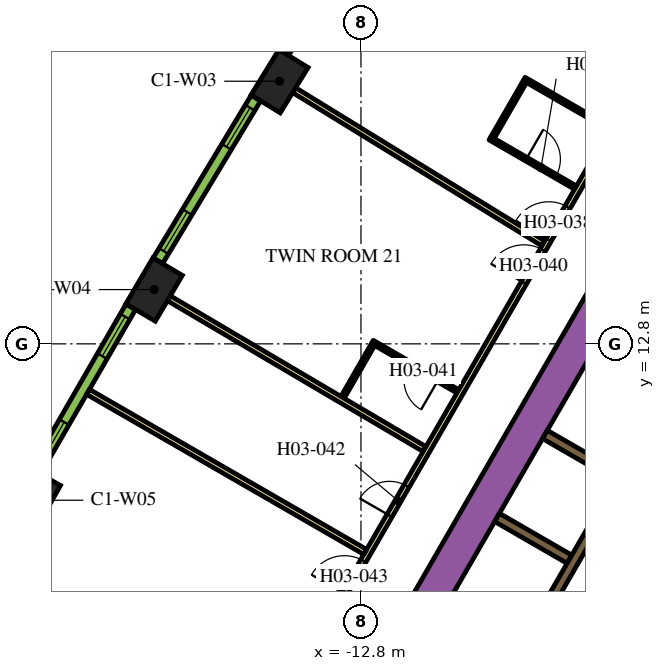
"""IFC4 building model, lengths in metres.
Left out: names, types, materials, properties, quantities, classifications, styles, units other than length and angle.
Written with IfcOpenShell. Run it as: python <this file> out.ifc"""

import sys

from ifc_helpers import new_model, si_unit, direction, frame, frame_2d, origin, origin_2d, place, context, subcontext, project, spatial, rectangle, extrude, element, fill, save


model = new_model("IFC4")
c1 = context("Model", 3, precision=1e-05, world=origin(), true_north=direction((0.0, 1.0)))
c2 = subcontext(c1, "Body", "Model", "MODEL_VIEW")
j1 = project(units=[si_unit("LENGTHUNIT", "METRE"), si_unit("PLANEANGLEUNIT", "RADIAN")], contexts=[c1])
p1 = place(None, origin())
s1 = spatial("IfcSite", under=j1, at=p1, CompositionType="ELEMENT")
p2 = place(p1, origin())
s2 = spatial("IfcBuilding", under=s1, at=p2, CompositionType="ELEMENT")
p3 = place(p2, frame((0.0, 0.0, 54.9)))
s3 = spatial("IfcBuildingStorey", under=s2, at=p3, CompositionType="ELEMENT", Elevation=54.9)
for number, where, z_axis, x_axis in (
    (1, (-14.942, 19.71, 0.0), (0.0, 0.0, 1.0), (-0.524, -0.852, 0.0)),
    (2, (-18.243, 14.228, 0.0), (0.0, 0.0, 1.0), (-0.508, -0.861, 0.0)),
    (3, (-21.443, 8.685, 0.0), (0.0, 0.0, 1.0), (-0.492, -0.871, 0.0)),
):
    element("IfcColumn", number, at=place(p3, frame(where, z_axis=z_axis, x_axis=x_axis)), inside=s3, PredefinedType="COLUMN", context=c2, shape_type="SweptSolid", body=[
        extrude(rectangle(XDim=1.4, YDim=0.9, at=origin_2d()), origin(), (0.0, 0.0, 1.0), 3.9),
    ])
p4 = place(p3, frame((-14.268, 0.387, 0.0), z_axis=(0.0, 0.0, 1.0), x_axis=(0.499994617707, 0.866028511231, 0.0)))
e4 = element("IfcWall", 4, at=p4, inside=s3, PredefinedType="SOLIDWALL", context=c2, shape_type="SweptSolid", body=[
    extrude(rectangle(XDim=18.817, YDim=0.9, at=frame_2d((9.409, 0.0))), origin(), (0.0, 0.0, 1.0), 3.9),
])
p5 = place(p3, frame((-8.06, -1.311, 0.0), z_axis=(0.0, 0.0, 1.0), x_axis=(0.50000273126, 0.866023826885, 0.0)))
e5 = element("IfcWall", 5, at=p5, inside=s3, PredefinedType="SOLIDWALL", context=c2, shape_type="SweptSolid", body=[
    extrude(rectangle(XDim=10.33, YDim=0.25, at=frame_2d((5.165, 0.0))), origin(), (0.0, 0.0, 1.0), 3.9),
])
p6 = place(p3, frame((-7.314, 7.132, 0.0), z_axis=(0.0, 0.0, 1.0), x_axis=(-0.866008176907, 0.50002983664, 0.0)))
e6 = element("IfcWall", 6, at=p6, inside=s3, PredefinedType="SOLIDWALL", context=c2, shape_type="SweptSolid", body=[
    extrude(rectangle(XDim=2.2, YDim=0.25, at=frame_2d((1.1, 0.0))), origin(), (0.0, 0.0, 1.0), 3.9),
])
p7 = place(p3, frame((-7.959, 10.415, 0.0), z_axis=(0.0, 0.0, 1.0), x_axis=(0.866020958405, -0.500007699544, 0.0)))
e7 = element("IfcWall", 7, at=p7, inside=s3, PredefinedType="SOLIDWALL", context=c2, shape_type="SweptSolid", body=[
    extrude(rectangle(XDim=4.1, YDim=0.25, at=frame_2d((2.05, 0.0))), origin(), (0.0, 0.0, 1.0), 3.9),
])
p8 = place(p3, frame((-6.008, 9.144, 0.0), z_axis=(0.0, 0.0, 1.0), x_axis=(-0.500006956611, -0.866021387346, 0.0)))
e8 = element("IfcWall", 8, at=p8, inside=s3, PredefinedType="SOLIDWALL", context=c2, shape_type="SweptSolid", body=[
    extrude(rectangle(XDim=9.83, YDim=0.25, at=frame_2d((4.915, 0.0))), origin(), (0.0, 0.0, 1.0), 3.9),
])
p9 = place(p8, frame((6.985, 0.0, 0.0)))
e9 = element("IfcOpeningElement", 9, at=p9, cuts=e8, PredefinedType="OPENING", context=c2, shape_type="SweptSolid", body=[
    extrude(rectangle(XDim=0.9, YDim=2.1, at=frame_2d((0.45, 1.05))), frame((0.0, 0.135, 0.0), z_axis=(0.0, -1.0, 0.0), x_axis=(1.0, 0.0, 0.0)), (0.0, 0.0, 1.0), 0.27),
])
p10 = place(p3, frame((-19.081, -3.9, 0.0), z_axis=(0.0, 0.0, 1.0), x_axis=(0.499998313975, 0.866026377209, 0.0)))
e10 = element("IfcWall", 10, at=p10, inside=s3, PredefinedType="PARTITIONING", context=c2, shape_type="SweptSolid", body=[
    extrude(rectangle(XDim=25.766, YDim=0.15, at=frame_2d((12.883, 0.0))), origin(), (0.0, 0.0, 1.0), 2.75),
])
p11 = place(p10, frame((22.445, 0.0, 0.0)))
e11 = element("IfcOpeningElement", 11, at=p11, cuts=e10, PredefinedType="OPENING", context=c2, shape_type="SweptSolid", body=[
    extrude(rectangle(XDim=1.0, YDim=2.1, at=frame_2d((0.5, 1.05))), frame((0.0, 0.085, 0.0), z_axis=(0.0, -1.0, 0.0), x_axis=(1.0, 0.0, 0.0)), (0.0, 0.0, 1.0), 0.17),
])
p12 = place(p10, frame((21.138, 0.0, 0.0)))
e12 = element("IfcOpeningElement", 12, at=p12, cuts=e10, PredefinedType="OPENING", context=c2, shape_type="SweptSolid", body=[
    extrude(rectangle(XDim=1.0, YDim=2.1, at=frame_2d((0.5, 1.05))), frame((0.0, 0.085, 0.0), z_axis=(0.0, -1.0, 0.0), x_axis=(1.0, 0.0, 0.0)), (0.0, 0.0, 1.0), 0.17),
])
p13 = place(p10, frame((14.066, 0.0, 0.0)))
e13 = element("IfcOpeningElement", 13, at=p13, cuts=e10, PredefinedType="OPENING", context=c2, shape_type="SweptSolid", body=[
    extrude(rectangle(XDim=0.9, YDim=2.1, at=frame_2d((0.45, 1.05))), frame((0.0, 0.085, 0.0), z_axis=(0.0, -1.0, 0.0), x_axis=(1.0, 0.0, 0.0)), (0.0, 0.0, 1.0), 0.17),
])
p14 = place(p10, frame((11.693, 0.0, 0.0)))
e14 = element("IfcOpeningElement", 14, at=p14, cuts=e10, PredefinedType="OPENING", context=c2, shape_type="SweptSolid", body=[
    extrude(rectangle(XDim=1.0, YDim=2.1, at=frame_2d((0.5, 1.05))), frame((0.0, 0.085, 0.0), z_axis=(0.0, -1.0, 0.0), x_axis=(1.0, 0.0, 0.0)), (0.0, 0.0, 1.0), 0.17),
])
p15 = place(p3, frame((-19.982, 11.537, 0.0), z_axis=(0.0, 0.0, 1.0), x_axis=(0.866020994654, -0.500007636761, 0.0)))
e15 = element("IfcWall", 15, at=p15, inside=s3, PredefinedType="PARTITIONING", context=c2, shape_type="SweptSolid", body=[
    extrude(rectangle(XDim=8.423, YDim=0.15, at=frame_2d((4.211, 0.0))), origin(), (0.0, 0.0, 1.0), 2.75),
])
p16 = place(p3, frame((-17.856, 13.999, 0.0), z_axis=(0.0, 0.0, 1.0), x_axis=(0.861371519381, -0.507975497047, 0.0)))
e16 = element("IfcWall", 16, at=p16, inside=s3, PredefinedType="PARTITIONING", context=c2, shape_type="SweptSolid", body=[
    extrude(rectangle(XDim=7.804, YDim=0.15, at=frame_2d((3.902, 0.0))), origin(), (0.0, 0.0, 1.0), 2.75),
])
p17 = place(p3, frame((-14.558, 19.475, 0.0), z_axis=(0.0, 0.0, 1.0), x_axis=(0.851829455142, -0.523819223925, 0.0)))
e17 = element("IfcWall", 17, at=p17, inside=s3, PredefinedType="PARTITIONING", context=c2, shape_type="SweptSolid", body=[
    extrude(rectangle(XDim=7.688, YDim=0.15, at=frame_2d((3.844, 0.0))), origin(), (0.0, 0.0, 1.0), 2.75),
])
p18 = place(p3, frame((-11.16, 24.888, 0.0), z_axis=(0.0, 0.0, 1.0), x_axis=(0.84199813156, -0.539480441211, 0.0)))
e18 = element("IfcWall", 18, at=p18, inside=s3, PredefinedType="PARTITIONING", context=c2, shape_type="SweptSolid", body=[
    extrude(rectangle(XDim=11.638, YDim=0.15, at=frame_2d((5.819, 0.0))), origin(), (0.0, 0.0, 1.0), 2.75),
])
p19 = place(p3, frame((-9.405, 18.21, 0.0), z_axis=(0.0, 0.0, 1.0), x_axis=(0.865997922154, -0.500047596559, 0.0)))
e19 = element("IfcWall", 19, at=p19, inside=s3, PredefinedType="PARTITIONING", context=c2, shape_type="SweptSolid", body=[
    extrude(rectangle(XDim=2.6, YDim=0.1, at=frame_2d((1.3, 0.0))), origin(), (0.0, 0.0, 1.0), 2.75),
])
p20 = place(p19, frame((1.1, 0.0, 0.0)))
e20 = element("IfcOpeningElement", 20, at=p20, cuts=e19, PredefinedType="OPENING", context=c2, shape_type="SweptSolid", body=[
    extrude(rectangle(XDim=0.9, YDim=2.1, at=frame_2d((0.45, 1.05))), frame((0.0, 0.06, 0.0), z_axis=(0.0, -1.0, 0.0), x_axis=(1.0, 0.0, 0.0)), (0.0, 0.0, 1.0), 0.12),
])
p21 = place(p3, frame((-9.336, 18.229, 0.0), z_axis=(0.0, 0.0, 1.0), x_axis=(0.499954529098, 0.86605165483, 0.0)))
e21 = element("IfcWall", 21, at=p21, inside=s3, PredefinedType="PARTITIONING", context=c2, shape_type="SweptSolid", body=[
    extrude(rectangle(XDim=1.7, YDim=0.1, at=frame_2d((0.85, 0.0))), origin(), (0.0, 0.0, 1.0), 2.75),
])
p22 = place(p3, frame((-6.253, 18.469, 0.0), z_axis=(0.0, 0.0, 1.0), x_axis=(-0.866021400173, 0.500006934395, 0.0)))
e22 = element("IfcWall", 22, at=p22, inside=s3, PredefinedType="PARTITIONING", context=c2, shape_type="SweptSolid", body=[
    extrude(rectangle(XDim=2.6, YDim=0.1, at=frame_2d((1.3, 0.0))), origin(), (0.0, 0.0, 1.0), 2.75),
])
p23 = place(p3, frame((-10.249, 11.549, 0.0), z_axis=(0.0, 0.0, 1.0), x_axis=(-0.866021400173, 0.500006934395, 0.0)))
e23 = element("IfcWall", 23, at=p23, inside=s3, PredefinedType="PARTITIONING", context=c2, shape_type="SweptSolid", body=[
    extrude(rectangle(XDim=2.6, YDim=0.1, at=frame_2d((1.3, 0.0))), origin(), (0.0, 0.0, 1.0), 2.75),
])
p24 = place(p23, frame((0.6, 0.0, 0.0)))
e24 = element("IfcOpeningElement", 24, at=p24, cuts=e23, PredefinedType="OPENING", context=c2, shape_type="SweptSolid", body=[
    extrude(rectangle(XDim=0.9, YDim=2.1, at=frame_2d((0.45, 1.05))), frame((0.0, 0.06, 0.0), z_axis=(0.0, -1.0, 0.0), x_axis=(1.0, 0.0, 0.0)), (0.0, 0.0, 1.0), 0.12),
])
p25 = place(p3, frame((-12.487, 12.772, 0.0), z_axis=(0.0, 0.0, 1.0), x_axis=(-0.500085729368, -0.865975902253, 0.0)))
e25 = element("IfcWall", 25, at=p25, inside=s3, PredefinedType="PARTITIONING", context=c2, shape_type="SweptSolid", body=[
    extrude(rectangle(XDim=1.59, YDim=0.1, at=frame_2d((0.795, 0.0))), origin(), (0.0, 0.0, 1.0), 2.75),
])
p26 = place(p3, frame((-12.17, 24.699, 0.0), z_axis=(0.0, 0.0, 1.0), x_axis=(-0.531688286542, -0.846940119462, 0.0)))
e26 = element("IfcWall", 26, at=p26, inside=s3, PredefinedType="SOLIDWALL", context=c2, shape_type="SweptSolid", body=[
    extrude(rectangle(XDim=4.998, YDim=0.29, at=frame_2d((2.499, 0.0))), origin(), (0.0, 0.0, 1.0), 3.65),
])
p27 = place(p26, frame((0.297, 0.0, 0.9)))
e27 = element("IfcOpeningElement", 27, at=p27, cuts=e26, PredefinedType="OPENING", context=c2, shape_type="SweptSolid", body=[
    extrude(rectangle(XDim=1.2, YDim=2.15, at=frame_2d((0.6, 1.075))), frame((0.0, 0.155, 0.0), z_axis=(0.0, -1.0, 0.0), x_axis=(1.0, 0.0, 0.0)), (0.0, 0.0, 1.0), 0.31),
])
p28 = place(p26, frame((3.501, 0.0, 0.9)))
e28 = element("IfcOpeningElement", 28, at=p28, cuts=e26, PredefinedType="OPENING", context=c2, shape_type="SweptSolid", body=[
    extrude(rectangle(XDim=1.2, YDim=2.15, at=frame_2d((0.6, 1.075))), frame((0.0, 0.155, 0.0), z_axis=(0.0, -1.0, 0.0), x_axis=(1.0, 0.0, 0.0)), (0.0, 0.0, 1.0), 0.31),
])
p29 = place(p3, frame((-15.564, 19.267, 0.0), z_axis=(0.0, 0.0, 1.0), x_axis=(-0.515938796285, -0.856625448191, 0.0)))
e29 = element("IfcWall", 29, at=p29, inside=s3, PredefinedType="SOLIDWALL", context=c2, shape_type="SweptSolid", body=[
    extrude(rectangle(XDim=4.998, YDim=0.29, at=frame_2d((2.499, 0.0))), origin(), (0.0, 0.0, 1.0), 3.65),
])
p30 = place(p29, frame((0.297, 0.0, 0.9)))
e30 = element("IfcOpeningElement", 30, at=p30, cuts=e29, PredefinedType="OPENING", context=c2, shape_type="SweptSolid", body=[
    extrude(rectangle(XDim=1.2, YDim=2.15, at=frame_2d((0.6, 1.075))), frame((0.0, 0.155, 0.0), z_axis=(0.0, -1.0, 0.0), x_axis=(1.0, 0.0, 0.0)), (0.0, 0.0, 1.0), 0.31),
])
p31 = place(p29, frame((3.501, 0.0, 0.9)))
e31 = element("IfcOpeningElement", 31, at=p31, cuts=e29, PredefinedType="OPENING", context=c2, shape_type="SweptSolid", body=[
    extrude(rectangle(XDim=1.2, YDim=2.15, at=frame_2d((0.6, 1.075))), frame((0.0, 0.155, 0.0), z_axis=(0.0, -1.0, 0.0), x_axis=(1.0, 0.0, 0.0)), (0.0, 0.0, 1.0), 0.31),
])
p32 = place(p3, frame((-18.858, 13.773, 0.0), z_axis=(0.0, 0.0, 1.0), x_axis=(-0.50002123722, -0.866013142123, 0.0)))
e32 = element("IfcWall", 32, at=p32, inside=s3, PredefinedType="SOLIDWALL", context=c2, shape_type="SweptSolid", body=[
    extrude(rectangle(XDim=4.998, YDim=0.29, at=frame_2d((2.499, 0.0))), origin(), (0.0, 0.0, 1.0), 3.65),
])
p33 = place(p32, frame((0.297, 0.0, 0.9)))
e33 = element("IfcOpeningElement", 33, at=p33, cuts=e32, PredefinedType="OPENING", context=c2, shape_type="SweptSolid", body=[
    extrude(rectangle(XDim=1.2, YDim=2.15, at=frame_2d((0.6, 1.075))), frame((0.0, 0.155, 0.0), z_axis=(0.0, -1.0, 0.0), x_axis=(1.0, 0.0, 0.0)), (0.0, 0.0, 1.0), 0.31),
])
p34 = place(p32, frame((3.501, 0.0, 0.9)))
e34 = element("IfcOpeningElement", 34, at=p34, cuts=e32, PredefinedType="OPENING", context=c2, shape_type="SweptSolid", body=[
    extrude(rectangle(XDim=1.2, YDim=2.15, at=frame_2d((0.6, 1.075))), frame((0.0, 0.155, 0.0), z_axis=(0.0, -1.0, 0.0), x_axis=(1.0, 0.0, 0.0)), (0.0, 0.0, 1.0), 0.31),
])
p35 = place(p11, origin())
e35 = element("IfcDoor", 35, at=p35, inside=s3, OperationType="SINGLE_SWING_LEFT", PredefinedType="DOOR", context=c2, shape_type="SweptSolid", body=[
    extrude(rectangle(XDim=1.0, YDim=2.1, at=frame_2d((0.5, 1.05))), frame((0.0, 0.025, 0.0), z_axis=(0.0, -1.0, 0.0), x_axis=(1.0, 0.0, 0.0)), (0.0, 0.0, 1.0), 0.05),
])
fill(e11, e35)
p36 = place(p20, origin())
e36 = element("IfcDoor", 36, at=p36, inside=s3, OperationType="SINGLE_SWING_LEFT", PredefinedType="DOOR", context=c2, shape_type="SweptSolid", body=[
    extrude(rectangle(XDim=0.9, YDim=2.1, at=frame_2d((0.45, 1.05))), frame((0.0, 0.025, 0.0), z_axis=(0.0, -1.0, 0.0), x_axis=(1.0, 0.0, 0.0)), (0.0, 0.0, 1.0), 0.05),
])
fill(e20, e36)
p37 = place(p12, origin())
e37 = element("IfcDoor", 37, at=p37, inside=s3, OperationType="SINGLE_SWING_RIGHT", PredefinedType="DOOR", context=c2, shape_type="SweptSolid", body=[
    extrude(rectangle(XDim=1.0, YDim=2.1, at=frame_2d((0.5, 1.05))), frame((0.0, 0.025, 0.0), z_axis=(0.0, -1.0, 0.0), x_axis=(1.0, 0.0, 0.0)), (0.0, 0.0, 1.0), 0.05),
])
fill(e12, e37)
p38 = place(p24, origin())
e38 = element("IfcDoor", 38, at=p38, inside=s3, OperationType="SINGLE_SWING_RIGHT", PredefinedType="DOOR", context=c2, shape_type="SweptSolid", body=[
    extrude(rectangle(XDim=0.9, YDim=2.1, at=frame_2d((0.45, 1.05))), frame((0.0, 0.025, 0.0), z_axis=(0.0, -1.0, 0.0), x_axis=(1.0, 0.0, 0.0)), (0.0, 0.0, 1.0), 0.05),
])
fill(e24, e38)
p39 = place(p13, origin())
e39 = element("IfcDoor", 39, at=p39, inside=s3, OperationType="SINGLE_SWING_RIGHT", PredefinedType="DOOR", context=c2, shape_type="SweptSolid", body=[
    extrude(rectangle(XDim=0.9, YDim=2.1, at=frame_2d((0.45, 1.05))), frame((0.0, 0.025, 0.0), z_axis=(0.0, -1.0, 0.0), x_axis=(1.0, 0.0, 0.0)), (0.0, 0.0, 1.0), 0.05),
])
fill(e13, e39)
p40 = place(p14, origin())
e40 = element("IfcDoor", 40, at=p40, inside=s3, OperationType="SINGLE_SWING_RIGHT", PredefinedType="DOOR", context=c2, shape_type="SweptSolid", body=[
    extrude(rectangle(XDim=1.0, YDim=2.1, at=frame_2d((0.5, 1.05))), frame((0.0, 0.025, 0.0), z_axis=(0.0, -1.0, 0.0), x_axis=(1.0, 0.0, 0.0)), (0.0, 0.0, 1.0), 0.05),
])
fill(e14, e40)
p41 = place(p30, origin())
e41 = element("IfcWindow", 41, at=p41, inside=s3, PartitioningType="DOUBLE_PANEL_VERTICAL", PredefinedType="WINDOW", context=c2, shape_type="SweptSolid", body=[
    extrude(rectangle(XDim=1.2, YDim=2.15, at=frame_2d((0.6, 1.075))), frame((0.0, 0.015, 0.0), z_axis=(0.0, -1.0, 0.0), x_axis=(1.0, 0.0, 0.0)), (0.0, 0.0, 1.0), 0.06),
])
fill(e30, e41)
p42 = place(p31, origin())
e42 = element("IfcWindow", 42, at=p42, inside=s3, PartitioningType="DOUBLE_PANEL_VERTICAL", PredefinedType="WINDOW", context=c2, shape_type="SweptSolid", body=[
    extrude(rectangle(XDim=1.2, YDim=2.15, at=frame_2d((0.6, 1.075))), frame((0.0, 0.015, 0.0), z_axis=(0.0, -1.0, 0.0), x_axis=(1.0, 0.0, 0.0)), (0.0, 0.0, 1.0), 0.06),
])
fill(e31, e42)
p43 = place(p33, origin())
e43 = element("IfcWindow", 43, at=p43, inside=s3, PartitioningType="DOUBLE_PANEL_VERTICAL", PredefinedType="WINDOW", context=c2, shape_type="SweptSolid", body=[
    extrude(rectangle(XDim=1.2, YDim=2.15, at=frame_2d((0.6, 1.075))), frame((0.0, 0.015, 0.0), z_axis=(0.0, -1.0, 0.0), x_axis=(1.0, 0.0, 0.0)), (0.0, 0.0, 1.0), 0.06),
])
fill(e33, e43)
p44 = place(p34, origin())
e44 = element("IfcWindow", 44, at=p44, inside=s3, PartitioningType="DOUBLE_PANEL_VERTICAL", PredefinedType="WINDOW", context=c2, shape_type="SweptSolid", body=[
    extrude(rectangle(XDim=1.2, YDim=2.15, at=frame_2d((0.6, 1.075))), frame((0.0, 0.015, 0.0), z_axis=(0.0, -1.0, 0.0), x_axis=(1.0, 0.0, 0.0)), (0.0, 0.0, 1.0), 0.06),
])
fill(e34, e44)
save(model, sys.argv[1])
